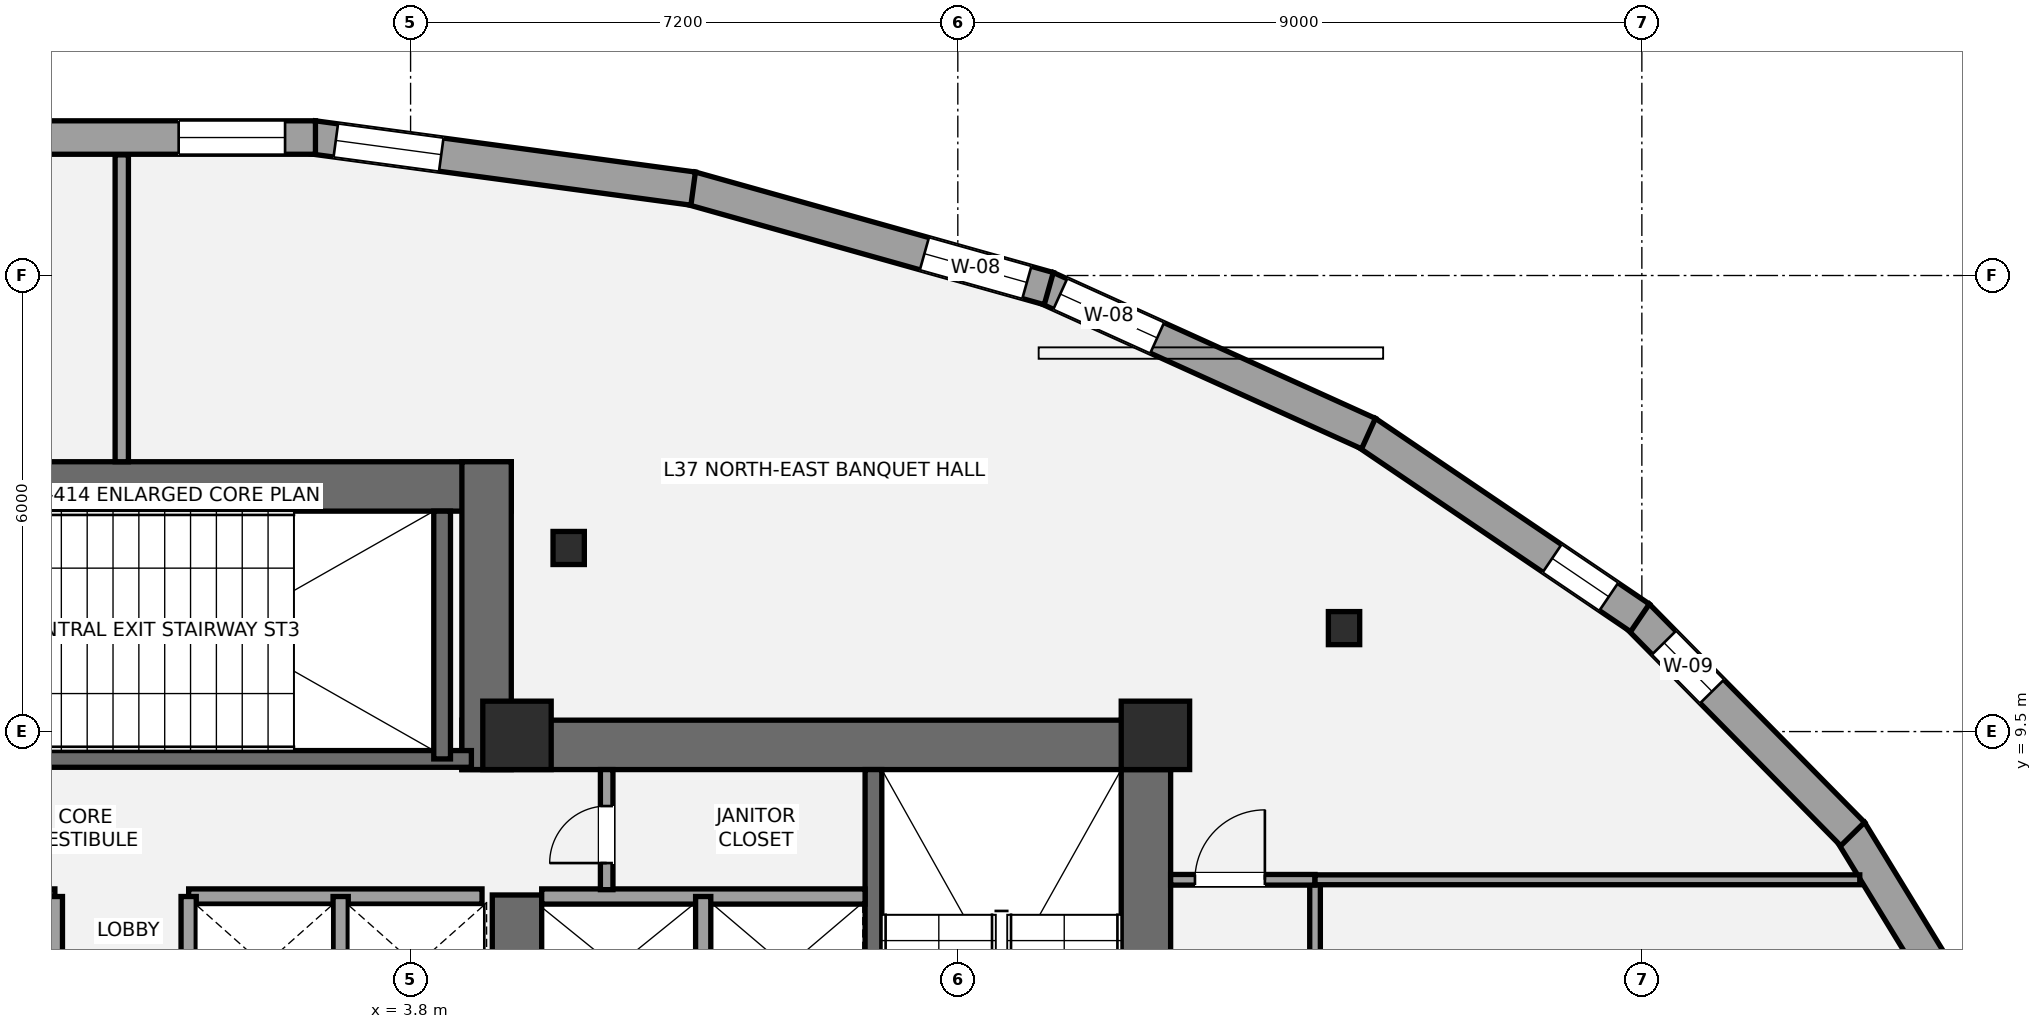
"""IFC4 building model, lengths in metres.
Left out: names, types, materials, properties, quantities, classifications, styles, units other than length and angle.
Written with IfcOpenShell. Run it as: python <this file> out.ifc"""

import sys

from ifc_helpers import new_model, si_unit, direction, frame, frame_2d, origin, origin_2d, place, context, subcontext, project, spatial, rectangle, i_section, extrude, element, fill, save


model = new_model("IFC4")
c1 = context("Model", 3, precision=1e-05, world=origin(), true_north=direction((0.0, 1.0)))
c2 = subcontext(c1, "Body", "Model", "MODEL_VIEW")
j1 = project(units=[si_unit("LENGTHUNIT", "METRE"), si_unit("PLANEANGLEUNIT", "RADIAN")], contexts=[c1])
p1 = place(None, origin())
s1 = spatial("IfcSite", under=j1, at=p1, CompositionType="ELEMENT")
p2 = place(p1, origin())
s2 = spatial("IfcBuilding", under=s1, at=p2, CompositionType="ELEMENT")
p3 = place(p2, frame((0.0, 0.0, 139.6)))
s3 = spatial("IfcBuildingStorey", under=s2, at=p3, CompositionType="ELEMENT", Elevation=139.6)
p4 = place(p3, frame((13.475, 1.2, 0.0), z_axis=(0.0, 0.0, 1.0), x_axis=(0.0, 1.0, 0.0)))
e1 = element("IfcWall", 1, at=p4, inside=s3, PredefinedType="SHEAR", context=c2, shape_type="SweptSolid", body=[
    extrude(rectangle(XDim=8.45, YDim=0.65, at=frame_2d((4.225, 0.0))), origin(), (0.0, 0.0, 1.0), 4.2),
])
p5 = place(p3, frame((4.475, 9.325, 0.0), z_axis=(0.0, 0.0, 1.0), x_axis=(1.0, 0.0, 0.0)))
e2 = element("IfcWall", 2, at=p5, inside=s3, PredefinedType="SHEAR", context=c2, shape_type="SweptSolid", body=[
    extrude(rectangle(XDim=9.325, YDim=0.65, at=frame_2d((4.663, 0.0))), origin(), (0.0, 0.0, 1.0), 4.2),
])
p6 = place(p3, frame((5.2, 5.35, 0.0), z_axis=(0.0, 0.0, 1.0), x_axis=(0.0, 1.0, 0.0)))
e3 = element("IfcWall", 3, at=p6, inside=s3, PredefinedType="SHEAR", context=c2, shape_type="SweptSolid", body=[
    extrude(rectangle(XDim=2.0, YDim=0.65, at=frame_2d((1.0, 0.0))), origin(), (0.0, 0.0, 1.0), 4.2),
])
p7 = place(p3, frame((9.89, 1.85, 0.0), z_axis=(0.0, 0.0, 1.0), x_axis=(0.0, 1.0, 0.0)))
e4 = element("IfcWall", 4, at=p7, inside=s3, PredefinedType="SHEAR", context=c2, shape_type="SweptSolid", body=[
    extrude(rectangle(XDim=7.15, YDim=0.22, at=frame_2d((3.575, 0.0))), origin(), (0.0, 0.0, 1.0), 4.2),
])
p8 = place(p3, frame((-5.125, 12.725, 0.0), z_axis=(0.0, 0.0, 1.0), x_axis=(1.0, 0.0, 0.0)))
e5 = element("IfcWall", 5, at=p8, inside=s3, PredefinedType="SHEAR", context=c2, shape_type="SweptSolid", body=[
    extrude(rectangle(XDim=10.25, YDim=0.65, at=frame_2d((5.125, 0.0))), origin(), (0.0, 0.0, 1.0), 4.2),
])
p9 = place(p3, frame((4.8, 9.0, 0.0), z_axis=(0.0, 0.0, 1.0), x_axis=(0.0, 1.0, 0.0)))
e6 = element("IfcWall", 6, at=p9, inside=s3, PredefinedType="SHEAR", context=c2, shape_type="SweptSolid", body=[
    extrude(rectangle(XDim=4.05, YDim=0.65, at=frame_2d((2.025, 0.0))), origin(), (0.0, 0.0, 1.0), 4.2),
])
p10 = place(p3, frame((-4.7, 9.14, 0.0), z_axis=(0.0, 0.0, 1.0), x_axis=(1.0, 0.0, 0.0)))
e7 = element("IfcWall", 7, at=p10, inside=s3, PredefinedType="SHEAR", context=c2, shape_type="SweptSolid", body=[
    extrude(rectangle(XDim=9.3, YDim=0.22, at=frame_2d((4.65, 0.0))), origin(), (0.0, 0.0, 1.0), 4.2),
])
p11 = place(p10, frame((1.15, 0.0, 0.0)))
e8 = element("IfcOpeningElement", 8, at=p11, cuts=e7, PredefinedType="OPENING", context=c2, shape_type="SweptSolid", body=[
    extrude(rectangle(XDim=1.05, YDim=2.15, at=frame_2d((0.525, 1.075))), frame((0.0, 0.12, 0.0), z_axis=(0.0, -1.0, 0.0), x_axis=(1.0, 0.0, 0.0)), (0.0, 0.0, 1.0), 0.24),
])
p12 = place(p3, frame((4.215, 9.14, 0.0), z_axis=(0.0, 0.0, 1.0), x_axis=(0.0, 1.0, 0.0)))
e9 = element("IfcWall", 9, at=p12, inside=s3, PredefinedType="SHEAR", context=c2, shape_type="SweptSolid", body=[
    extrude(rectangle(XDim=3.26, YDim=0.22, at=frame_2d((1.63, 0.0))), origin(), (0.0, 0.0, 1.0), 4.2),
])
for number, where, z_axis, x_axis in (
    (10, (5.2, 9.45, 0.0), (0.0, 0.0, 1.0), (1.0, 0.0, 0.0)),
    (11, (13.6, 9.45, 0.0), (0.0, 0.0, 1.0), (1.0, 0.0, 0.0)),
):
    element("IfcColumn", number, at=place(p3, frame(where, z_axis=z_axis, x_axis=x_axis)), inside=s3, PredefinedType="COLUMN", context=c2, shape_type="SweptSolid", body=[
        extrude(rectangle(XDim=0.9, YDim=0.9, at=origin_2d()), origin(), (0.0, 0.0, 1.0), 4.2),
    ])
for number, where, z_axis, x_axis in (
    (12, (16.082, 10.861, 0.0), (0.0, 0.0, 1.0), (1.0, 0.0, 0.0)),
    (13, (5.88, 11.915, 0.0), (0.0, 0.0, 1.0), (1.0, 0.0, 0.0)),
):
    element("IfcColumn", number, at=place(p3, frame(where, z_axis=z_axis, x_axis=x_axis)), inside=s3, PredefinedType="COLUMN", context=c2, shape_type="SweptSolid", body=[
        extrude(i_section(OverallWidth=0.412, OverallDepth=0.435, WebThickness=0.036, FlangeThickness=0.057, at=origin_2d()), origin(), (0.0, 0.0, 1.0), 4.2),
    ])
p13 = place(p3, frame((22.742, 8.191, 0.0), z_axis=(0.0, 0.0, 1.0), x_axis=(0.521476412293, -0.853265698022, 0.0)))
e14 = element("IfcWall", 14, at=p13, inside=s3, PredefinedType="STANDARD", context=c2, shape_type="SweptSolid", body=[
    extrude(rectangle(XDim=3.74, YDim=0.44, at=frame_2d((1.87, 0.0))), origin(), (0.0, 0.0, 1.0), 3.238),
])
p14 = place(p13, frame((2.391, 0.0, 0.42)))
e15 = element("IfcOpeningElement", 15, at=p14, cuts=e14, PredefinedType="OPENING", context=c2, shape_type="SweptSolid", body=[
    extrude(rectangle(XDim=0.9, YDim=1.35, at=frame_2d((0.45, 0.675))), frame((0.0, 0.23, 0.0), z_axis=(0.0, -1.0, 0.0), x_axis=(1.0, 0.0, 0.0)), (0.0, 0.0, 1.0), 0.46),
])
p15 = place(p3, frame((19.942, 11.023, 0.0), z_axis=(0.0, 0.0, 1.0), x_axis=(0.702094935552, -0.712083352897, 0.0)))
e16 = element("IfcWall", 16, at=p15, inside=s3, PredefinedType="STANDARD", context=c2, shape_type="SweptSolid", body=[
    extrude(rectangle(XDim=4.033, YDim=0.44, at=frame_2d((2.017, 0.0))), origin(), (0.0, 0.0, 1.0), 3.238),
])
p16 = place(p15, frame((0.498, 0.0, 0.58)))
e17 = element("IfcOpeningElement", 17, at=p16, cuts=e16, PredefinedType="OPENING", context=c2, shape_type="SweptSolid", body=[
    extrude(rectangle(XDim=0.9, YDim=1.35, at=frame_2d((0.45, 0.675))), frame((0.0, 0.23, 0.0), z_axis=(0.0, -1.0, 0.0), x_axis=(1.0, 0.0, 0.0)), (0.0, 0.0, 1.0), 0.46),
])
p17 = place(p3, frame((16.371, 13.438, 0.0), z_axis=(0.0, 0.0, 1.0), x_axis=(0.827816201219, -0.56099940909, 0.0)))
e18 = element("IfcWall", 18, at=p17, inside=s3, PredefinedType="STANDARD", context=c2, shape_type="SweptSolid", body=[
    extrude(rectangle(XDim=4.354, YDim=0.44, at=frame_2d((2.177, 0.0))), origin(), (0.0, 0.0, 1.0), 3.242),
])
p18 = place(p17, frame((2.958, 0.0, 0.58)))
e19 = element("IfcOpeningElement", 19, at=p18, cuts=e18, PredefinedType="OPENING", context=c2, shape_type="SweptSolid", body=[
    extrude(rectangle(XDim=0.9, YDim=1.35, at=frame_2d((0.45, 0.675))), frame((0.0, 0.23, 0.0), z_axis=(0.0, -1.0, 0.0), x_axis=(1.0, 0.0, 0.0)), (0.0, 0.0, 1.0), 0.46),
])
p19 = place(p3, frame((12.166, 15.339, 0.0), z_axis=(0.0, 0.0, 1.0), x_axis=(0.910938924115, -0.412541242221, 0.0)))
e20 = element("IfcWall", 20, at=p19, inside=s3, PredefinedType="STANDARD", context=c2, shape_type="SweptSolid", body=[
    extrude(rectangle(XDim=4.652, YDim=0.44, at=frame_2d((2.326, 0.0))), origin(), (0.0, 0.0, 1.0), 3.238),
])
p20 = place(p19, frame((0.2, 0.0, 0.58)))
e21 = element("IfcOpeningElement", 21, at=p20, cuts=e20, PredefinedType="OPENING", context=c2, shape_type="SweptSolid", body=[
    extrude(rectangle(XDim=1.4, YDim=1.55, at=frame_2d((0.7, 0.775))), frame((0.0, 0.23, 0.0), z_axis=(0.0, -1.0, 0.0), x_axis=(1.0, 0.0, 0.0)), (0.0, 0.0, 1.0), 0.46),
])
p21 = place(p3, frame((7.488, 16.649, 0.0), z_axis=(0.0, 0.0, 1.0), x_axis=(0.962790668442, -0.270248272446, 0.0)))
e22 = element("IfcWall", 22, at=p21, inside=s3, PredefinedType="STANDARD", context=c2, shape_type="SweptSolid", body=[
    extrude(rectangle(XDim=4.891, YDim=0.44, at=frame_2d((2.445, 0.0))), origin(), (0.0, 0.0, 1.0), 3.238),
])
p22 = place(p21, frame((3.191, 0.0, 0.58)))
e23 = element("IfcOpeningElement", 23, at=p22, cuts=e22, PredefinedType="OPENING", context=c2, shape_type="SweptSolid", body=[
    extrude(rectangle(XDim=1.4, YDim=1.55, at=frame_2d((0.7, 0.775))), frame((0.0, 0.23, 0.0), z_axis=(0.0, -1.0, 0.0), x_axis=(1.0, 0.0, 0.0)), (0.0, 0.0, 1.0), 0.46),
])
p23 = place(p3, frame((2.519, 17.317, 0.0), z_axis=(0.0, 0.0, 1.0), x_axis=(0.99103751038, -0.133583880086, 0.0)))
e24 = element("IfcWall", 24, at=p23, inside=s3, PredefinedType="STANDARD", context=c2, shape_type="SweptSolid", body=[
    extrude(rectangle(XDim=5.044, YDim=0.44, at=frame_2d((2.522, 0.0))), origin(), (0.0, 0.0, 1.0), 3.238),
])
p24 = place(p23, frame((0.3, 0.0, 0.58)))
e25 = element("IfcOpeningElement", 25, at=p24, cuts=e24, PredefinedType="OPENING", context=c2, shape_type="SweptSolid", body=[
    extrude(rectangle(XDim=1.4, YDim=1.55, at=frame_2d((0.7, 0.775))), frame((0.0, 0.23, 0.0), z_axis=(0.0, -1.0, 0.0), x_axis=(1.0, 0.0, 0.0)), (0.0, 0.0, 1.0), 0.46),
])
p25 = place(p3, frame((-2.548, 17.315, 0.0), z_axis=(0.0, 0.0, 1.0), x_axis=(1.0, 0.0, 0.0)))
e26 = element("IfcWall", 26, at=p25, inside=s3, PredefinedType="STANDARD", context=c2, shape_type="SweptSolid", body=[
    extrude(rectangle(XDim=5.097, YDim=0.44, at=frame_2d((2.548, 0.0))), origin(), (0.0, 0.0, 1.0), 3.242),
])
p26 = place(p25, frame((3.297, 0.0, 0.58)))
e27 = element("IfcOpeningElement", 27, at=p26, cuts=e26, PredefinedType="OPENING", context=c2, shape_type="SweptSolid", body=[
    extrude(rectangle(XDim=1.4, YDim=1.55, at=frame_2d((0.7, 0.775))), frame((0.0, 0.23, 0.0), z_axis=(0.0, -1.0, 0.0), x_axis=(1.0, 0.0, 0.0)), (0.0, 0.0, 1.0), 0.46),
])
p27 = place(p3, frame((5.525, 7.33, 0.0), z_axis=(0.0, 0.0, 1.0), x_axis=(1.0, 0.0, 0.0)))
e28 = element("IfcWall", 28, at=p27, inside=s3, PredefinedType="SOLIDWALL", context=c2, shape_type="SweptSolid", body=[
    extrude(rectangle(XDim=4.255, YDim=0.2, at=frame_2d((2.127, 0.0))), origin(), (0.0, 0.0, 1.0), 4.02),
])
p28 = place(p3, frame((7.65, 5.47, 0.0), z_axis=(0.0, 0.0, 1.0), x_axis=(0.0, 1.0, 0.0)))
e29 = element("IfcWall", 29, at=p28, inside=s3, PredefinedType="SOLIDWALL", context=c2, shape_type="SweptSolid", body=[
    extrude(rectangle(XDim=1.86, YDim=0.2, at=frame_2d((0.93, 0.0))), origin(), (0.0, 0.0, 1.0), 4.02),
])
for number, where, z_axis, x_axis in (
    (30, (-4.74, 7.33, 0.0), (0.0, 0.0, 1.0), (1.0, 0.0, 0.0)),
    (31, (0.88, 7.33, 0.0), (0.0, 0.0, 1.0), (1.0, 0.0, 0.0)),
):
    element("IfcWall", number, at=place(p3, frame(where, z_axis=z_axis, x_axis=x_axis)), inside=s3, PredefinedType="SOLIDWALL", context=c2, shape_type="SweptSolid", body=[
        extrude(rectangle(XDim=3.86, YDim=0.2, at=frame_2d((1.93, 0.0))), origin(), (0.0, 0.0, 1.0), 4.02),
    ])
for number, where, z_axis, x_axis in (
    (32, (2.88, 5.52, 0.0), (0.0, 0.0, 1.0), (0.0, 1.0, 0.0)),
    (33, (-0.88, 5.52, 0.0), (0.0, 0.0, 1.0), (0.0, 1.0, 0.0)),
    (34, (0.88, 5.52, 0.0), (0.0, 0.0, 1.0), (0.0, 1.0, 0.0)),
):
    element("IfcWall", number, at=place(p3, frame(where, z_axis=z_axis, x_axis=x_axis)), inside=s3, PredefinedType="SOLIDWALL", context=c2, shape_type="SweptSolid", body=[
        extrude(rectangle(XDim=1.81, YDim=0.2, at=frame_2d((0.905, 0.0))), origin(), (0.0, 0.0, 1.0), 4.02),
    ])
p29 = place(p3, frame((6.38, 7.42, 0.0), z_axis=(0.0, 0.0, 1.0), x_axis=(0.0, 1.0, 0.0)))
e35 = element("IfcWall", 35, at=p29, inside=s3, PredefinedType="PARTITIONING", context=c2, shape_type="SweptSolid", body=[
    extrude(rectangle(XDim=1.58, YDim=0.165, at=frame_2d((0.79, 0.0))), origin(), (0.0, 0.0, 1.0), 4.02),
])
p30 = place(p29, frame((0.35, 0.0, 0.0)))
e36 = element("IfcOpeningElement", 36, at=p30, cuts=e35, PredefinedType="OPENING", context=c2, shape_type="SweptSolid", body=[
    extrude(rectangle(XDim=0.75, YDim=2.1, at=frame_2d((0.375, 1.05))), frame((0.0, 0.093, 0.0), z_axis=(0.0, -1.0, 0.0), x_axis=(1.0, 0.0, 0.0)), (0.0, 0.0, 1.0), 0.185),
])
p31 = place(p3, frame((15.7, -13.488, 0.0), z_axis=(0.0, 0.0, 1.0), x_axis=(0.0, 1.0, 0.0)))
e37 = element("IfcWall", 37, at=p31, inside=s3, PredefinedType="PARTITIONING", context=c2, shape_type="SweptSolid", body=[
    extrude(rectangle(XDim=21.038, YDim=0.14, at=frame_2d((10.519, 0.0))), origin(), (0.0, 0.0, 1.0), 3.473),
])
p32 = place(p31, frame((7.821, 0.0, 0.0)))
e38 = element("IfcOpeningElement", 38, at=p32, cuts=e37, PredefinedType="OPENING", context=c2, shape_type="SweptSolid", body=[
    extrude(rectangle(XDim=0.9, YDim=2.1, at=frame_2d((0.45, 1.05))), frame((0.0, 0.08, 0.0), z_axis=(0.0, -1.0, 0.0), x_axis=(1.0, 0.0, 0.0)), (0.0, 0.0, 1.0), 0.16),
])
p33 = place(p31, frame((10.153, 0.0, 0.0)))
e39 = element("IfcOpeningElement", 39, at=p33, cuts=e37, PredefinedType="OPENING", context=c2, shape_type="SweptSolid", body=[
    extrude(rectangle(XDim=0.9, YDim=2.1, at=frame_2d((0.45, 1.05))), frame((0.0, 0.08, 0.0), z_axis=(0.0, -1.0, 0.0), x_axis=(1.0, 0.0, 0.0)), (0.0, 0.0, 1.0), 0.16),
])
p34 = place(p31, frame((13.921, 0.0, 0.0)))
e40 = element("IfcOpeningElement", 40, at=p34, cuts=e37, PredefinedType="OPENING", context=c2, shape_type="SweptSolid", body=[
    extrude(rectangle(XDim=0.9, YDim=2.1, at=frame_2d((0.45, 1.05))), frame((0.0, 0.08, 0.0), z_axis=(0.0, -1.0, 0.0), x_axis=(1.0, 0.0, 0.0)), (0.0, 0.0, 1.0), 0.16),
])
p35 = place(p31, frame((18.513, 0.0, 0.0)))
e41 = element("IfcOpeningElement", 41, at=p35, cuts=e37, PredefinedType="OPENING", context=c2, shape_type="SweptSolid", body=[
    extrude(rectangle(XDim=0.9, YDim=2.1, at=frame_2d((0.45, 1.05))), frame((0.0, 0.08, 0.0), z_axis=(0.0, -1.0, 0.0), x_axis=(1.0, 0.0, 0.0)), (0.0, 0.0, 1.0), 0.16),
])
p36 = place(p3, frame((13.8, 7.55, 0.0), z_axis=(0.0, 0.0, 1.0), x_axis=(1.0, 0.0, 0.0)))
e42 = element("IfcWall", 42, at=p36, inside=s3, PredefinedType="PARTITIONING", context=c2, shape_type="SweptSolid", body=[
    extrude(rectangle(XDim=1.9, YDim=0.14, at=frame_2d((0.95, 0.0))), origin(), (0.0, 0.0, 1.0), 3.473),
])
p37 = place(p36, frame((0.32, 0.0, 0.0)))
e43 = element("IfcOpeningElement", 43, at=p37, cuts=e42, PredefinedType="OPENING", context=c2, shape_type="SweptSolid", body=[
    extrude(rectangle(XDim=0.92, YDim=2.15, at=frame_2d((0.46, 1.075))), frame((0.0, 0.08, 0.0), z_axis=(0.0, -1.0, 0.0), x_axis=(1.0, 0.0, 0.0)), (0.0, 0.0, 1.0), 0.16),
])
p38 = place(p3, frame((0.0, 13.05, 0.0), z_axis=(0.0, 0.0, 1.0), x_axis=(0.0, 1.0, 0.0)))
e44 = element("IfcWall", 44, at=p38, inside=s3, PredefinedType="PARTITIONING", context=c2, shape_type="SweptSolid", body=[
    extrude(rectangle(XDim=4.037, YDim=0.175, at=frame_2d((2.019, 0.0))), origin(), (0.0, 0.0, 1.0), 4.02),
])
p39 = place(p3, frame((15.7, 7.55, 0.0), z_axis=(0.0, 0.0, 1.0), x_axis=(1.0, 0.0, 0.0)))
e45 = element("IfcWall", 45, at=p39, inside=s3, PredefinedType="PARTITIONING", context=c2, shape_type="SweptSolid", body=[
    extrude(rectangle(XDim=7.167, YDim=0.13, at=frame_2d((3.583, 0.0))), origin(), (0.0, 0.0, 1.0), 3.473),
])
p40 = place(p16, origin())
e46 = element("IfcWindow", 46, at=p40, inside=s3, PartitioningType="SINGLE_PANEL", PredefinedType="WINDOW", context=c2, shape_type="SweptSolid", body=[
    extrude(rectangle(XDim=0.9, YDim=1.35, at=frame_2d((0.45, 0.675))), frame((0.0, -0.01, 0.0), z_axis=(0.0, -1.0, 0.0), x_axis=(1.0, 0.0, 0.0)), (0.0, 0.0, 1.0), 0.06),
])
fill(e17, e46)
p41 = place(p18, origin())
e47 = element("IfcWindow", 47, at=p41, inside=s3, PartitioningType="SINGLE_PANEL", PredefinedType="WINDOW", context=c2, shape_type="SweptSolid", body=[
    extrude(rectangle(XDim=0.9, YDim=1.35, at=frame_2d((0.45, 0.675))), frame((0.0, -0.01, 0.0), z_axis=(0.0, -1.0, 0.0), x_axis=(1.0, 0.0, 0.0)), (0.0, 0.0, 1.0), 0.06),
])
fill(e19, e47)
p42 = place(p20, origin())
e48 = element("IfcWindow", 48, at=p42, inside=s3, PartitioningType="SINGLE_PANEL", PredefinedType="WINDOW", context=c2, shape_type="SweptSolid", body=[
    extrude(rectangle(XDim=1.4, YDim=1.55, at=frame_2d((0.7, 0.775))), frame((0.0, -0.01, 0.0), z_axis=(0.0, -1.0, 0.0), x_axis=(1.0, 0.0, 0.0)), (0.0, 0.0, 1.0), 0.06),
])
fill(e21, e48)
p43 = place(p22, origin())
e49 = element("IfcWindow", 49, at=p43, inside=s3, PartitioningType="SINGLE_PANEL", PredefinedType="WINDOW", context=c2, shape_type="SweptSolid", body=[
    extrude(rectangle(XDim=1.4, YDim=1.55, at=frame_2d((0.7, 0.775))), frame((0.0, -0.01, 0.0), z_axis=(0.0, -1.0, 0.0), x_axis=(1.0, 0.0, 0.0)), (0.0, 0.0, 1.0), 0.06),
])
fill(e23, e49)
p44 = place(p24, origin())
e50 = element("IfcWindow", 50, at=p44, inside=s3, PartitioningType="SINGLE_PANEL", PredefinedType="WINDOW", context=c2, shape_type="SweptSolid", body=[
    extrude(rectangle(XDim=1.4, YDim=1.55, at=frame_2d((0.7, 0.775))), frame((0.0, -0.01, 0.0), z_axis=(0.0, -1.0, 0.0), x_axis=(1.0, 0.0, 0.0)), (0.0, 0.0, 1.0), 0.06),
])
fill(e25, e50)
p45 = place(p26, origin())
e51 = element("IfcWindow", 51, at=p45, inside=s3, PartitioningType="SINGLE_PANEL", PredefinedType="WINDOW", context=c2, shape_type="SweptSolid", body=[
    extrude(rectangle(XDim=1.4, YDim=1.55, at=frame_2d((0.7, 0.775))), frame((0.0, -0.01, 0.0), z_axis=(0.0, -1.0, 0.0), x_axis=(1.0, 0.0, 0.0)), (0.0, 0.0, 1.0), 0.06),
])
fill(e27, e51)
p46 = place(p30, origin())
e52 = element("IfcDoor", 52, at=p46, inside=s3, OperationType="SINGLE_SWING_LEFT", PredefinedType="DOOR", context=c2, shape_type="SweptSolid", body=[
    extrude(rectangle(XDim=0.75, YDim=2.1, at=frame_2d((0.375, 1.05))), frame((0.0, 0.025, 0.0), z_axis=(0.0, -1.0, 0.0), x_axis=(1.0, 0.0, 0.0)), (0.0, 0.0, 1.0), 0.05),
])
fill(e36, e52)
p47 = place(p37, origin())
e53 = element("IfcDoor", 53, at=p47, inside=s3, OperationType="SINGLE_SWING_RIGHT", PredefinedType="DOOR", context=c2, shape_type="SweptSolid", body=[
    extrude(rectangle(XDim=0.92, YDim=2.15, at=frame_2d((0.46, 1.075))), frame((0.0, 0.025, 0.0), z_axis=(0.0, -1.0, 0.0), x_axis=(1.0, 0.0, 0.0)), (0.0, 0.0, 1.0), 0.05),
])
fill(e43, e53)
save(model, sys.argv[1])
